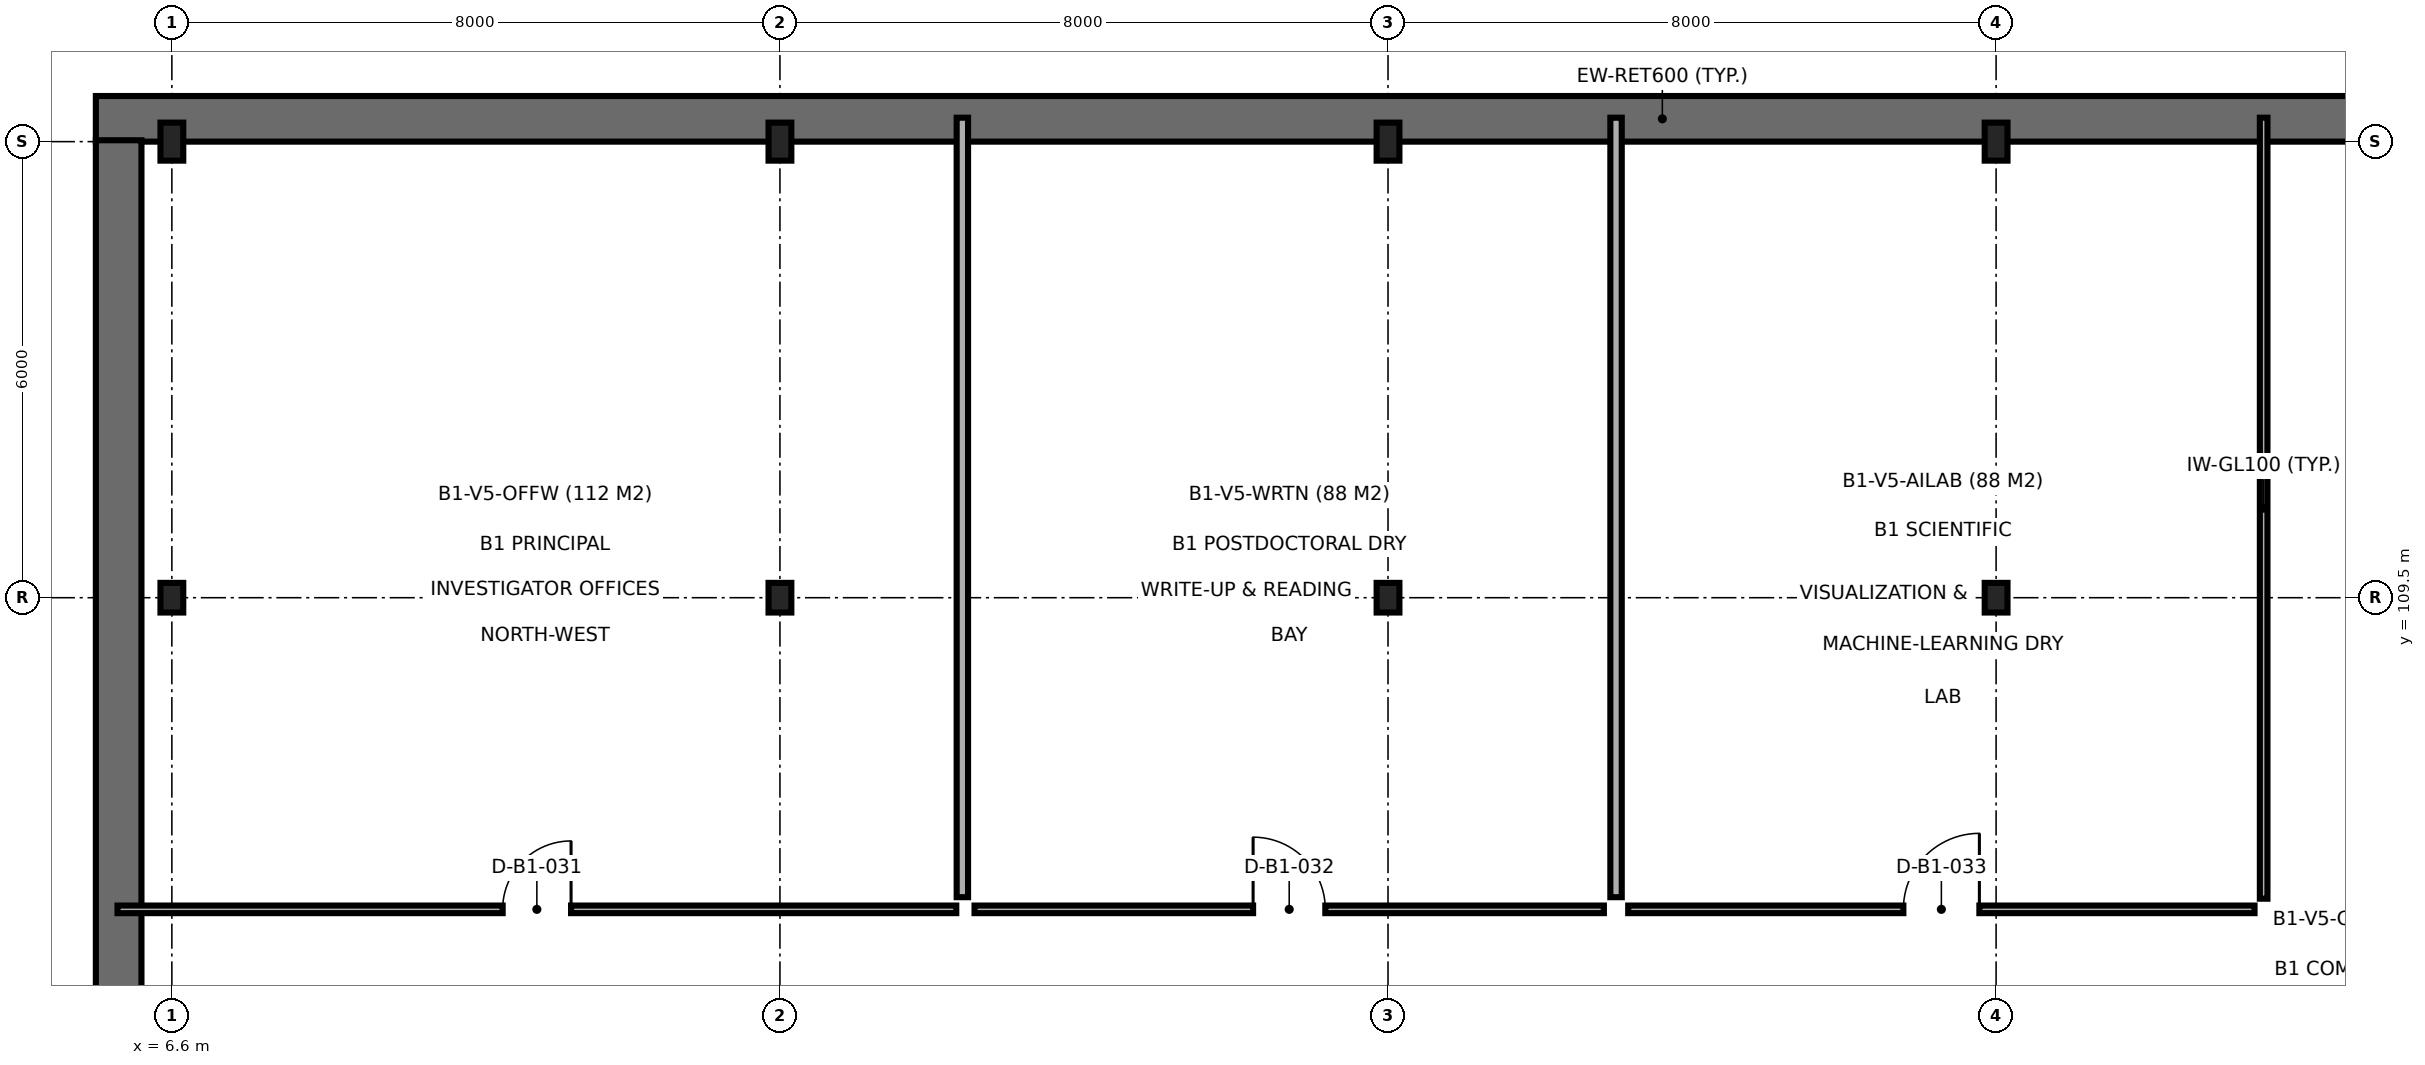
"""IFC4 building model, lengths in metres.
Left out: names, types, materials, properties, quantities, classifications, styles, units other than length and angle.
Written with IfcOpenShell. Run it as: python <this file> out.ifc"""

import sys

from ifc_helpers import new_model, si_unit, direction, frame, frame_2d, origin, origin_2d, place, context, subcontext, project, spatial, rectangle, i_section, extrude, element, fill, save


model = new_model("IFC4")
c1 = context("Model", 3, precision=1e-05, world=origin(), true_north=direction((0.0, 1.0)))
c2 = subcontext(c1, "Body", "Model", "MODEL_VIEW")
j1 = project(units=[si_unit("LENGTHUNIT", "METRE"), si_unit("PLANEANGLEUNIT", "RADIAN")], contexts=[c1])
p1 = place(None, origin())
s1 = spatial("IfcSite", under=j1, at=p1, CompositionType="ELEMENT")
p2 = place(p1, origin())
s2 = spatial("IfcBuilding", under=s1, at=p2, CompositionType="ELEMENT")
p3 = place(p2, frame((0.0, 0.0, -5.0)))
s3 = spatial("IfcBuildingStorey", under=s2, at=p3, CompositionType="ELEMENT", Elevation=-5.0)
p4 = place(p3, frame((6.6, 109.5, 0.0), z_axis=(0.0, 0.0, 1.0), x_axis=(1.0, 0.0, 0.0)))
e1 = element("IfcColumn", 1, at=p4, inside=s3, PredefinedType="COLUMN", context=c2, shape_type="SweptSolid", body=[
    extrude(i_section(OverallWidth=0.3, OverallDepth=0.39, WebThickness=0.011, FlangeThickness=0.019, FilletRadius=0.027, at=origin_2d()), origin(), (0.0, 0.0, 1.0), 5.0),
])
p5 = place(p3, frame((6.6, 115.5, 0.0), z_axis=(0.0, 0.0, 1.0), x_axis=(1.0, 0.0, 0.0)))
e2 = element("IfcColumn", 2, at=p5, inside=s3, PredefinedType="COLUMN", context=c2, shape_type="SweptSolid", body=[
    extrude(i_section(OverallWidth=0.3, OverallDepth=0.5, WebThickness=0.014, FlangeThickness=0.028, FilletRadius=0.027, at=origin_2d()), origin(), (0.0, 0.0, 1.0), 5.0),
])
p6 = place(p3, frame((14.6, 109.5, 0.0), z_axis=(0.0, 0.0, 1.0), x_axis=(1.0, 0.0, 0.0)))
e3 = element("IfcColumn", 3, at=p6, inside=s3, PredefinedType="COLUMN", context=c2, shape_type="SweptSolid", body=[
    extrude(i_section(OverallWidth=0.3, OverallDepth=0.39, WebThickness=0.011, FlangeThickness=0.019, FilletRadius=0.027, at=origin_2d()), origin(), (0.0, 0.0, 1.0), 5.0),
])
p7 = place(p3, frame((14.6, 115.5, 0.0), z_axis=(0.0, 0.0, 1.0), x_axis=(1.0, 0.0, 0.0)))
e4 = element("IfcColumn", 4, at=p7, inside=s3, PredefinedType="COLUMN", context=c2, shape_type="SweptSolid", body=[
    extrude(i_section(OverallWidth=0.3, OverallDepth=0.5, WebThickness=0.014, FlangeThickness=0.028, FilletRadius=0.027, at=origin_2d()), origin(), (0.0, 0.0, 1.0), 5.0),
])
p8 = place(p3, frame((22.6, 109.5, 0.0), z_axis=(0.0, 0.0, 1.0), x_axis=(1.0, 0.0, 0.0)))
e5 = element("IfcColumn", 5, at=p8, inside=s3, PredefinedType="COLUMN", context=c2, shape_type="SweptSolid", body=[
    extrude(i_section(OverallWidth=0.3, OverallDepth=0.39, WebThickness=0.011, FlangeThickness=0.019, FilletRadius=0.027, at=origin_2d()), origin(), (0.0, 0.0, 1.0), 5.0),
])
p9 = place(p3, frame((22.6, 115.5, 0.0), z_axis=(0.0, 0.0, 1.0), x_axis=(1.0, 0.0, 0.0)))
e6 = element("IfcColumn", 6, at=p9, inside=s3, PredefinedType="COLUMN", context=c2, shape_type="SweptSolid", body=[
    extrude(i_section(OverallWidth=0.3, OverallDepth=0.5, WebThickness=0.014, FlangeThickness=0.028, FilletRadius=0.027, at=origin_2d()), origin(), (0.0, 0.0, 1.0), 5.0),
])
p10 = place(p3, frame((30.6, 109.5, 0.0), z_axis=(0.0, 0.0, 1.0), x_axis=(1.0, 0.0, 0.0)))
e7 = element("IfcColumn", 7, at=p10, inside=s3, PredefinedType="COLUMN", context=c2, shape_type="SweptSolid", body=[
    extrude(i_section(OverallWidth=0.3, OverallDepth=0.39, WebThickness=0.011, FlangeThickness=0.019, FilletRadius=0.027, at=origin_2d()), origin(), (0.0, 0.0, 1.0), 5.0),
])
p11 = place(p3, frame((30.6, 115.5, 0.0), z_axis=(0.0, 0.0, 1.0), x_axis=(1.0, 0.0, 0.0)))
e8 = element("IfcColumn", 8, at=p11, inside=s3, PredefinedType="COLUMN", context=c2, shape_type="SweptSolid", body=[
    extrude(i_section(OverallWidth=0.3, OverallDepth=0.5, WebThickness=0.014, FlangeThickness=0.028, FilletRadius=0.027, at=origin_2d()), origin(), (0.0, 0.0, 1.0), 5.0),
])
p12 = place(p3, frame((46.818, 115.8, 0.0), z_axis=(0.0, 0.0, 1.0), x_axis=(-1.0, 0.0, 0.0)))
e9 = element("IfcWall", 9, at=p12, inside=s3, PredefinedType="SHEAR", context=c2, shape_type="SweptSolid", body=[
    extrude(rectangle(XDim=41.218, YDim=0.6, at=frame_2d((20.609, 0.0))), origin(), (0.0, 0.0, 1.0), 4.7),
])
p13 = place(p3, frame((5.9, 115.518, 0.0), z_axis=(0.0, 0.0, 1.0), x_axis=(0.0, -1.0, 0.0)))
e10 = element("IfcWall", 10, at=p13, inside=s3, PredefinedType="SHEAR", context=c2, shape_type="SweptSolid", body=[
    extrude(rectangle(XDim=30.618, YDim=0.6, at=frame_2d((15.309, 0.0))), origin(), (0.0, 0.0, 1.0), 4.7),
])
p14 = place(p3, frame((17.0, 105.56, 0.0), z_axis=(0.0, 0.0, 1.0), x_axis=(0.0, 1.0, 0.0)))
e11 = element("IfcWall", 11, at=p14, inside=s3, PredefinedType="PARTITIONING", context=c2, shape_type="SweptSolid", body=[
    extrude(rectangle(XDim=10.255, YDim=0.15, at=frame_2d((5.127, 0.0))), origin(), (0.0, 0.0, 1.0), 4.7),
])
p15 = place(p3, frame((25.6, 105.56, 0.0), z_axis=(0.0, 0.0, 1.0), x_axis=(0.0, 1.0, 0.0)))
e12 = element("IfcWall", 12, at=p15, inside=s3, PredefinedType="PARTITIONING", context=c2, shape_type="SweptSolid", body=[
    extrude(rectangle(XDim=10.255, YDim=0.15, at=frame_2d((5.127, 0.0))), origin(), (0.0, 0.0, 1.0), 4.4),
])
p16 = place(p3, frame((34.12, 105.54, 0.0), z_axis=(0.0, 0.0, 1.0), x_axis=(0.0, 1.0, 0.0)))
e13 = element("IfcWall", 13, at=p16, inside=s3, PredefinedType="PARTITIONING", context=c2, shape_type="SweptSolid", body=[
    extrude(rectangle(XDim=10.275, YDim=0.1, at=frame_2d((5.137, 0.0))), origin(), (0.0, 0.0, 1.0), 4.7),
])
p17 = place(p3, frame((5.885, 105.4, 0.0), z_axis=(0.0, 0.0, 1.0), x_axis=(1.0, 0.0, 0.0)))
e14 = element("IfcWall", 14, at=p17, inside=s3, PredefinedType="PARTITIONING", context=c2, shape_type="SweptSolid", body=[
    extrude(rectangle(XDim=11.035, YDim=0.1, at=frame_2d((5.518, 0.0))), origin(), (0.0, 0.0, 1.0), 4.7),
])
p18 = place(p17, frame((5.067, 0.0, 0.0)))
e15 = element("IfcOpeningElement", 15, at=p18, cuts=e14, PredefinedType="OPENING", context=c2, shape_type="SweptSolid", body=[
    extrude(rectangle(XDim=0.9, YDim=2.1, at=frame_2d((0.45, 1.05))), frame((0.0, 0.06, 0.0), z_axis=(0.0, -1.0, 0.0), x_axis=(1.0, 0.0, 0.0)), (0.0, 0.0, 1.0), 0.12),
])
p19 = place(p3, frame((17.16, 105.4, 0.0), z_axis=(0.0, 0.0, 1.0), x_axis=(1.0, 0.0, 0.0)))
e16 = element("IfcWall", 16, at=p19, inside=s3, PredefinedType="PARTITIONING", context=c2, shape_type="SweptSolid", body=[
    extrude(rectangle(XDim=8.28, YDim=0.1, at=frame_2d((4.14, 0.0))), origin(), (0.0, 0.0, 1.0), 4.7),
])
p20 = place(p19, frame((3.665, 0.0, 0.0)))
e17 = element("IfcOpeningElement", 17, at=p20, cuts=e16, PredefinedType="OPENING", context=c2, shape_type="SweptSolid", body=[
    extrude(rectangle(XDim=0.95, YDim=2.1, at=frame_2d((0.475, 1.05))), frame((0.0, 0.06, 0.0), z_axis=(0.0, -1.0, 0.0), x_axis=(1.0, 0.0, 0.0)), (0.0, 0.0, 1.0), 0.12),
])
p21 = place(p3, frame((25.76, 105.4, 0.0), z_axis=(0.0, 0.0, 1.0), x_axis=(1.0, 0.0, 0.0)))
e18 = element("IfcWall", 18, at=p21, inside=s3, PredefinedType="PARTITIONING", context=c2, shape_type="SweptSolid", body=[
    extrude(rectangle(XDim=8.24, YDim=0.1, at=frame_2d((4.12, 0.0))), origin(), (0.0, 0.0, 1.0), 4.7),
])
p22 = place(p21, frame((3.62, 0.0, 0.0)))
e19 = element("IfcOpeningElement", 19, at=p22, cuts=e18, PredefinedType="OPENING", context=c2, shape_type="SweptSolid", body=[
    extrude(rectangle(XDim=1.0, YDim=2.15, at=frame_2d((0.5, 1.075))), frame((0.0, 0.06, 0.0), z_axis=(0.0, -1.0, 0.0), x_axis=(1.0, 0.0, 0.0)), (0.0, 0.0, 1.0), 0.12),
])
p23 = place(p18, origin())
e20 = element("IfcDoor", 20, at=p23, inside=s3, OperationType="SINGLE_SWING_RIGHT", PredefinedType="DOOR", context=c2, shape_type="SweptSolid", body=[
    extrude(rectangle(XDim=0.9, YDim=2.1, at=frame_2d((0.45, 1.05))), frame((0.0, 0.025, 0.0), z_axis=(0.0, -1.0, 0.0), x_axis=(1.0, 0.0, 0.0)), (0.0, 0.0, 1.0), 0.05),
])
fill(e15, e20)
p24 = place(p20, origin())
e21 = element("IfcDoor", 21, at=p24, inside=s3, OperationType="SINGLE_SWING_LEFT", PredefinedType="DOOR", context=c2, shape_type="SweptSolid", body=[
    extrude(rectangle(XDim=0.95, YDim=2.1, at=frame_2d((0.475, 1.05))), frame((0.0, 0.025, 0.0), z_axis=(0.0, -1.0, 0.0), x_axis=(1.0, 0.0, 0.0)), (0.0, 0.0, 1.0), 0.05),
])
fill(e17, e21)
p25 = place(p22, origin())
e22 = element("IfcDoor", 22, at=p25, inside=s3, OperationType="SINGLE_SWING_RIGHT", PredefinedType="DOOR", context=c2, shape_type="SweptSolid", body=[
    extrude(rectangle(XDim=1.0, YDim=2.15, at=frame_2d((0.5, 1.075))), frame((0.0, 0.025, 0.0), z_axis=(0.0, -1.0, 0.0), x_axis=(1.0, 0.0, 0.0)), (0.0, 0.0, 1.0), 0.05),
])
fill(e19, e22)
save(model, sys.argv[1])
